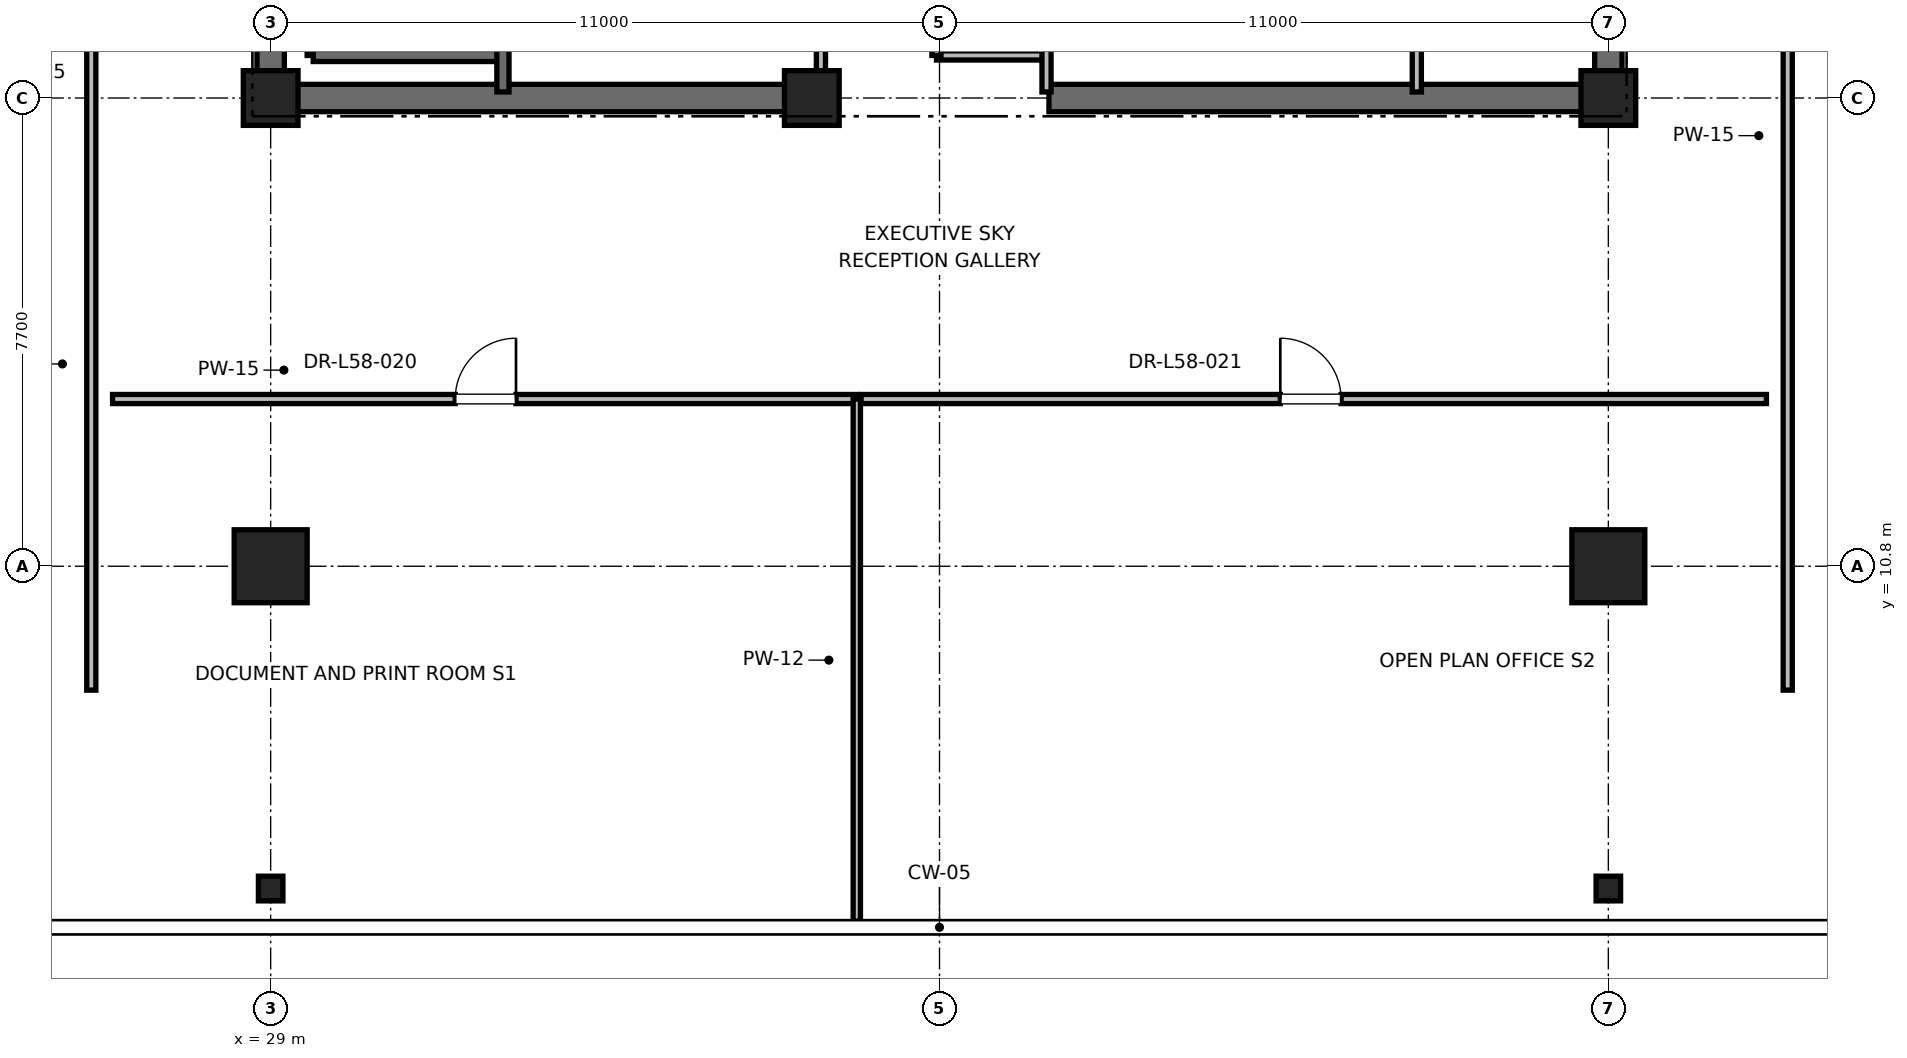
"""IFC4 building model, lengths in metres.
Left out: names, types, materials, properties, quantities, classifications, styles, units other than length and angle.
Written with IfcOpenShell. Run it as: python <this file> out.ifc"""

import sys

from ifc_helpers import new_model, si_unit, direction, frame, frame_2d, origin, origin_2d, place, context, subcontext, project, spatial, rectangle, i_section, extrude, element, fill, save


model = new_model("IFC4")
c1 = context("Model", 3, precision=1e-05, world=origin(), true_north=direction((0.0, 1.0)))
c2 = subcontext(c1, "Body", "Model", "MODEL_VIEW")
j1 = project(units=[si_unit("LENGTHUNIT", "METRE"), si_unit("PLANEANGLEUNIT", "RADIAN")], contexts=[c1])
p1 = place(None, origin())
s1 = spatial("IfcSite", under=j1, at=p1, CompositionType="ELEMENT")
p2 = place(p1, origin())
s2 = spatial("IfcBuilding", under=s1, at=p2, CompositionType="ELEMENT")
p3 = place(p2, frame((0.0, 0.0, 251.2)))
s3 = spatial("IfcBuildingStorey", under=s2, at=p3, CompositionType="ELEMENT", Elevation=251.2)
for number, where, z_axis, x_axis in (
    (1, (29.0, 10.8, 0.0), (0.0, 0.0, 1.0), (1.0, 0.0, 0.0)),
    (2, (51.0, 10.8, 0.0), (0.0, 0.0, 1.0), (1.0, 0.0, 0.0)),
):
    element("IfcColumn", number, at=place(p3, frame(where, z_axis=z_axis, x_axis=x_axis)), inside=s3, PredefinedType="COLUMN", context=c2, shape_type="SweptSolid", body=[
        extrude(rectangle(XDim=1.2, YDim=1.2, at=origin_2d()), origin(), (0.0, 0.0, 1.0), 4.0),
    ])
for number, where, z_axis, x_axis in (
    (3, (29.0, 5.5, 0.0), (0.0, 0.0, 1.0), (1.0, 0.0, 0.0)),
    (4, (51.0, 5.5, 0.0), (0.0, 0.0, 1.0), (1.0, 0.0, 0.0)),
):
    element("IfcColumn", number, at=place(p3, frame(where, z_axis=z_axis, x_axis=x_axis)), inside=s3, PredefinedType="COLUMN", context=c2, shape_type="SweptSolid", body=[
        extrude(i_section(OverallWidth=0.403, OverallDepth=0.406, WebThickness=0.027, FlangeThickness=0.043, FilletRadius=0.015, at=origin_2d()), origin(), (0.0, 0.0, 1.0), 4.0),
    ])
for number, where, z_axis, x_axis in (
    (5, (29.0, 18.5, 0.0), (0.0, 0.0, 1.0), (1.0, 0.0, 0.0)),
    (6, (51.0, 18.5, 0.0), (0.0, 0.0, 1.0), (1.0, 0.0, 0.0)),
    (7, (37.9, 18.5, 0.0), (0.0, 0.0, 1.0), (1.0, 0.0, 0.0)),
):
    element("IfcColumn", number, at=place(p3, frame(where, z_axis=z_axis, x_axis=x_axis)), inside=s3, PredefinedType="PILASTER", context=c2, shape_type="SweptSolid", body=[
        extrude(rectangle(XDim=0.9, YDim=0.9, at=origin_2d()), origin(), (0.0, 0.0, 1.0), 4.0),
    ])
for number, where, z_axis, x_axis in (
    (8, (29.0, 18.5, 0.0), (0.0, 0.0, 1.0), (1.0, 0.0, 0.0)),
    (9, (41.8, 18.5, 0.0), (0.0, 0.0, 1.0), (1.0, 0.0, 0.0)),
):
    element("IfcWall", number, at=place(p3, frame(where, z_axis=z_axis, x_axis=x_axis)), inside=s3, PredefinedType="SHEAR", context=c2, shape_type="SweptSolid", body=[
        extrude(rectangle(XDim=9.2, YDim=0.45, at=frame_2d((4.6, 0.0))), origin(), (0.0, 0.0, 1.0), 3.785),
    ])
p4 = place(p3, frame((29.0, 18.5, 0.0), z_axis=(0.0, 0.0, 1.0), x_axis=(0.0, 1.0, 0.0)))
e10 = element("IfcWall", 10, at=p4, inside=s3, PredefinedType="SHEAR", context=c2, shape_type="SweptSolid", body=[
    extrude(rectangle(XDim=8.8, YDim=0.45, at=frame_2d((4.4, 0.0))), origin(), (0.0, 0.0, 1.0), 3.785),
])
p5 = place(p3, frame((51.0, 18.5, 0.0), z_axis=(0.0, 0.0, 1.0), x_axis=(0.0, 1.0, 0.0)))
e11 = element("IfcWall", 11, at=p5, inside=s3, PredefinedType="SHEAR", context=c2, shape_type="SweptSolid", body=[
    extrude(rectangle(XDim=5.8, YDim=0.45, at=frame_2d((2.9, 0.0))), origin(), (0.0, 0.0, 1.0), 3.785),
])
p6 = place(p3, frame((29.7, 19.2, 0.0), z_axis=(0.0, 0.0, 1.0), x_axis=(0.0, 1.0, 0.0)))
e12 = element("IfcWall", 12, at=p6, inside=s3, PredefinedType="SOLIDWALL", context=c2, shape_type="SweptSolid", body=[
    extrude(rectangle(XDim=8.15, YDim=0.2, at=frame_2d((4.075, 0.0))), origin(), (0.0, 0.0, 1.0), 3.785),
])
p7 = place(p3, frame((29.7, 19.2, 0.0), z_axis=(0.0, 0.0, 1.0), x_axis=(1.0, 0.0, 0.0)))
e13 = element("IfcWall", 13, at=p7, inside=s3, PredefinedType="SOLIDWALL", context=c2, shape_type="SweptSolid", body=[
    extrude(rectangle(XDim=3.12, YDim=0.2, at=frame_2d((1.56, 0.0))), origin(), (0.0, 0.0, 1.0), 3.785),
])
p8 = place(p3, frame((32.82, 18.6, 0.0), z_axis=(0.0, 0.0, 1.0), x_axis=(0.0, 1.0, 0.0)))
e14 = element("IfcWall", 14, at=p8, inside=s3, PredefinedType="SOLIDWALL", context=c2, shape_type="SweptSolid", body=[
    extrude(rectangle(XDim=8.78, YDim=0.2, at=frame_2d((4.39, 0.0))), origin(), (0.0, 0.0, 1.0), 3.785),
])
p9 = place(p3, frame((39.95, 19.2, 0.0), z_axis=(0.0, 0.0, 1.0), x_axis=(1.0, 0.0, 0.0)))
e15 = element("IfcWall", 15, at=p9, inside=s3, PredefinedType="PARTITIONING", context=c2, shape_type="SweptSolid", body=[
    extrude(rectangle(XDim=1.81, YDim=0.15, at=frame_2d((0.905, 0.0))), origin(), (0.0, 0.0, 1.0), 2.85),
])
p10 = place(p3, frame((41.76, 18.6, 0.0), z_axis=(0.0, 0.0, 1.0), x_axis=(0.0, 1.0, 0.0)))
e16 = element("IfcWall", 16, at=p10, inside=s3, PredefinedType="PARTITIONING", context=c2, shape_type="SweptSolid", body=[
    extrude(rectangle(XDim=3.6, YDim=0.15, at=frame_2d((1.8, 0.0))), origin(), (0.0, 0.0, 1.0), 2.85),
])
p11 = place(p3, frame((39.95, 19.2, 0.0), z_axis=(0.0, 0.0, 1.0), x_axis=(0.0, 1.0, 0.0)))
e17 = element("IfcWall", 17, at=p11, inside=s3, PredefinedType="PARTITIONING", context=c2, shape_type="SweptSolid", body=[
    extrude(rectangle(XDim=3.0, YDim=0.15, at=frame_2d((1.5, 0.0))), origin(), (0.0, 0.0, 1.0), 2.85),
])
p12 = place(p11, frame((1.05, 0.0, 0.0)))
e18 = element("IfcOpeningElement", 18, at=p12, cuts=e17, PredefinedType="OPENING", context=c2, shape_type="SweptSolid", body=[
    extrude(rectangle(XDim=0.9, YDim=2.1, at=frame_2d((0.45, 1.05))), frame((0.0, 0.075, 0.0), z_axis=(0.0, -1.0, 0.0), x_axis=(1.0, 0.0, 0.0)), (0.0, 0.0, 1.0), 0.15),
])
p13 = place(p3, frame((38.05, 18.6, 0.0), z_axis=(0.0, 0.0, 1.0), x_axis=(0.0, 1.0, 0.0)))
e19 = element("IfcWall", 19, at=p13, inside=s3, PredefinedType="PARTITIONING", context=c2, shape_type="SweptSolid", body=[
    extrude(rectangle(XDim=8.78, YDim=0.15, at=frame_2d((4.39, 0.0))), origin(), (0.0, 0.0, 1.0), 2.85),
])
p14 = place(p13, frame((3.89, 0.0, 0.0)))
e20 = element("IfcOpeningElement", 20, at=p14, cuts=e19, PredefinedType="OPENING", context=c2, shape_type="SweptSolid", body=[
    extrude(rectangle(XDim=1.0, YDim=2.15, at=frame_2d((0.5, 1.075))), frame((0.0, 0.075, 0.0), z_axis=(0.0, -1.0, 0.0), x_axis=(1.0, 0.0, 0.0)), (0.0, 0.0, 1.0), 0.15),
])
p15 = place(p3, frame((47.85, 18.6, 0.0), z_axis=(0.0, 0.0, 1.0), x_axis=(0.0, 1.0, 0.0)))
e21 = element("IfcWall", 21, at=p15, inside=s3, PredefinedType="PARTITIONING", context=c2, shape_type="SweptSolid", body=[
    extrude(rectangle(XDim=2.54, YDim=0.15, at=frame_2d((1.27, 0.0))), origin(), (0.0, 0.0, 1.0), 2.85),
])
p16 = place(p3, frame((26.4, 13.55, 0.0), z_axis=(0.0, 0.0, 1.0), x_axis=(1.0, 0.0, 0.0)))
e22 = element("IfcWall", 22, at=p16, inside=s3, PredefinedType="PARTITIONING", context=c2, shape_type="SweptSolid", body=[
    extrude(rectangle(XDim=12.24, YDim=0.15, at=frame_2d((6.12, 0.0))), origin(), (0.0, 0.0, 1.0), 2.85),
])
p17 = place(p16, frame((5.635, 0.0, 0.0)))
e23 = element("IfcOpeningElement", 23, at=p17, cuts=e22, PredefinedType="OPENING", context=c2, shape_type="SweptSolid", body=[
    extrude(rectangle(XDim=1.0, YDim=2.15, at=frame_2d((0.5, 1.075))), frame((0.0, 0.075, 0.0), z_axis=(0.0, -1.0, 0.0), x_axis=(1.0, 0.0, 0.0)), (0.0, 0.0, 1.0), 0.15),
])
p18 = place(p3, frame((38.64, 4.962, 0.0), z_axis=(0.0, 0.0, 1.0), x_axis=(0.0, 1.0, 0.0)))
e24 = element("IfcWall", 24, at=p18, inside=s3, PredefinedType="PARTITIONING", context=c2, shape_type="SweptSolid", body=[
    extrude(rectangle(XDim=8.588, YDim=0.12, at=frame_2d((4.294, 0.0))), origin(), (0.0, 0.0, 1.0), 2.415),
])
p19 = place(p3, frame((38.71, 13.55, 0.0), z_axis=(0.0, 0.0, 1.0), x_axis=(1.0, 0.0, 0.0)))
e25 = element("IfcWall", 25, at=p19, inside=s3, PredefinedType="PARTITIONING", context=c2, shape_type="SweptSolid", body=[
    extrude(rectangle(XDim=14.89, YDim=0.15, at=frame_2d((7.445, 0.0))), origin(), (0.0, 0.0, 1.0), 2.85),
])
p20 = place(p19, frame((6.895, 0.0, 0.0)))
e26 = element("IfcOpeningElement", 26, at=p20, cuts=e25, PredefinedType="OPENING", context=c2, shape_type="SweptSolid", body=[
    extrude(rectangle(XDim=1.0, YDim=2.15, at=frame_2d((0.5, 1.075))), frame((0.0, 0.075, 0.0), z_axis=(0.0, -1.0, 0.0), x_axis=(1.0, 0.0, 0.0)), (0.0, 0.0, 1.0), 0.15),
])
p21 = place(p3, frame((26.05, 8.762, 0.0), z_axis=(0.0, 0.0, 1.0), x_axis=(0.0, 1.0, 0.0)))
e27 = element("IfcWall", 27, at=p21, inside=s3, PredefinedType="PARTITIONING", context=c2, shape_type="SweptSolid", body=[
    extrude(rectangle(XDim=12.741, YDim=0.15, at=frame_2d((6.371, 0.0))), origin(), (0.0, 0.0, 1.0), 2.85),
])
p22 = place(p21, frame((10.729, 0.0, 0.0)))
e28 = element("IfcOpeningElement", 28, at=p22, cuts=e27, PredefinedType="OPENING", context=c2, shape_type="SweptSolid", body=[
    extrude(rectangle(XDim=1.05, YDim=2.2, at=frame_2d((0.525, 1.1))), frame((0.0, 0.075, 0.0), z_axis=(0.0, -1.0, 0.0), x_axis=(1.0, 0.0, 0.0)), (0.0, 0.0, 1.0), 0.15),
])
p23 = place(p3, frame((53.95, 8.762, 0.0), z_axis=(0.0, 0.0, 1.0), x_axis=(0.0, 1.0, 0.0)))
e29 = element("IfcWall", 29, at=p23, inside=s3, PredefinedType="PARTITIONING", context=c2, shape_type="SweptSolid", body=[
    extrude(rectangle(XDim=37.475, YDim=0.15, at=frame_2d((18.738, 0.0))), origin(), (0.0, 0.0, 1.0), 2.85),
])
p24 = place(p23, frame((18.238, 0.0, 0.0)))
e30 = element("IfcOpeningElement", 30, at=p24, cuts=e29, PredefinedType="OPENING", context=c2, shape_type="SweptSolid", body=[
    extrude(rectangle(XDim=1.0, YDim=2.15, at=frame_2d((0.5, 1.075))), frame((0.0, 0.075, 0.0), z_axis=(0.0, -1.0, 0.0), x_axis=(1.0, 0.0, 0.0)), (0.0, 0.0, 1.0), 0.15),
])
p25 = place(p17, origin())
e31 = element("IfcDoor", 31, at=p25, inside=s3, OperationType="SINGLE_SWING_RIGHT", PredefinedType="DOOR", context=c2, shape_type="SweptSolid", body=[
    extrude(rectangle(XDim=1.0, YDim=2.15, at=frame_2d((0.5, 1.075))), frame((0.0, 0.025, 0.0), z_axis=(0.0, -1.0, 0.0), x_axis=(1.0, 0.0, 0.0)), (0.0, 0.0, 1.0), 0.05),
])
fill(e23, e31)
p26 = place(p20, origin())
e32 = element("IfcDoor", 32, at=p26, inside=s3, OperationType="SINGLE_SWING_LEFT", PredefinedType="DOOR", context=c2, shape_type="SweptSolid", body=[
    extrude(rectangle(XDim=1.0, YDim=2.15, at=frame_2d((0.5, 1.075))), frame((0.0, 0.025, 0.0), z_axis=(0.0, -1.0, 0.0), x_axis=(1.0, 0.0, 0.0)), (0.0, 0.0, 1.0), 0.05),
])
fill(e26, e32)
save(model, sys.argv[1])
